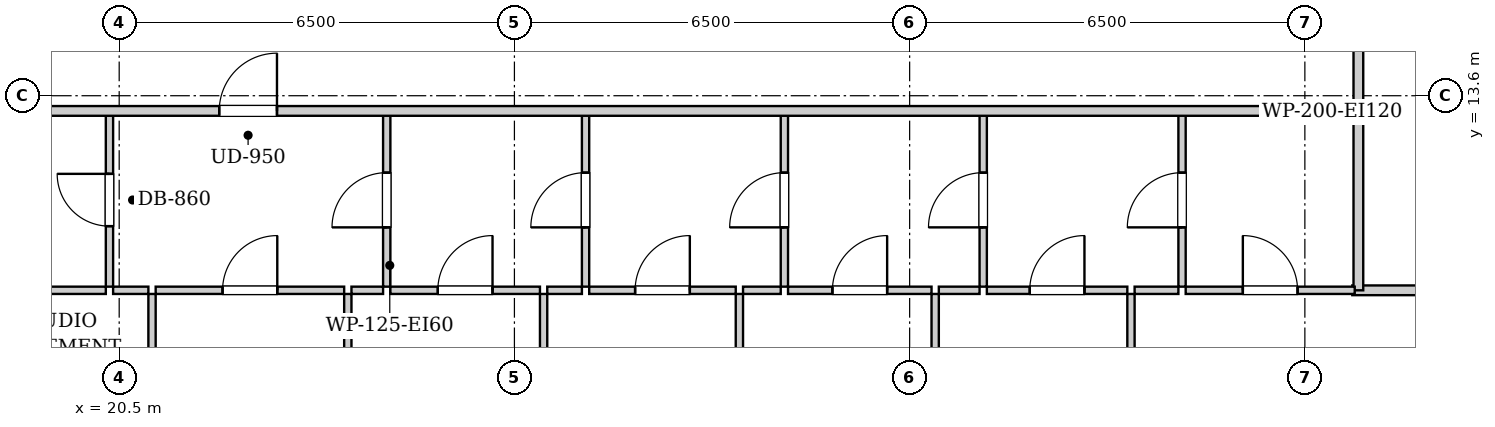
"""IFC4 building model, lengths in metres.
Left out: names, types, materials, properties, quantities, classifications, styles, units other than length and angle.
Written with IfcOpenShell. Run it as: python <this file> out.ifc"""

import sys

from ifc_helpers import new_model, si_unit, direction, frame, frame_2d, origin, place, context, subcontext, project, spatial, rectangle, extrude, element, fill, save


model = new_model("IFC4")
c1 = context("Model", 3, precision=1e-05, world=origin(), true_north=direction((0.0, 1.0)))
c2 = subcontext(c1, "Body", "Model", "MODEL_VIEW")
j1 = project(units=[si_unit("LENGTHUNIT", "METRE"), si_unit("PLANEANGLEUNIT", "RADIAN")], contexts=[c1])
p1 = place(None, origin())
s1 = spatial("IfcSite", under=j1, at=p1, CompositionType="ELEMENT")
p2 = place(p1, origin())
s2 = spatial("IfcBuilding", under=s1, at=p2, CompositionType="ELEMENT")
p3 = place(p2, frame((0.0, 0.0, 110.3)))
s3 = spatial("IfcBuildingStorey", under=s2, at=p3, CompositionType="ELEMENT", Elevation=110.3)
p4 = place(p3, frame((40.88, 13.35, 0.0), z_axis=(0.0, 0.0, 1.0), x_axis=(0.0, 1.0, 0.0)))
e1 = element("IfcWall", 1, at=p4, inside=s3, PredefinedType="PARTITIONING", context=c2, shape_type="SweptSolid", body=[
    extrude(rectangle(XDim=1.74, YDim=0.16, at=frame_2d((0.87, 0.0))), origin(), (0.0, 0.0, 1.0), 2.94),
])
p5 = place(p3, frame((40.78, 10.4, 0.0), z_axis=(0.0, 0.0, 1.0), x_axis=(1.0, 0.0, 0.0)))
e2 = element("IfcWall", 2, at=p5, inside=s3, PredefinedType="PARTITIONING", context=c2, shape_type="SweptSolid", body=[
    extrude(rectangle(XDim=2.34, YDim=0.16, at=frame_2d((1.17, 0.0))), origin(), (0.0, 0.0, 1.0), 2.94),
])
p6 = place(p3, frame((40.88, 10.4, 0.0), z_axis=(0.0, 0.0, 1.0), x_axis=(0.0, 1.0, 0.0)))
e3 = element("IfcWall", 3, at=p6, inside=s3, PredefinedType="PARTITIONING", context=c2, shape_type="SweptSolid", body=[
    extrude(rectangle(XDim=2.91, YDim=0.16, at=frame_2d((1.455, 0.0))), origin(), (0.0, 0.0, 1.0), 2.94),
])
p7 = place(p3, frame((20.34, 10.46, 0.0), z_axis=(0.0, 0.0, 1.0), x_axis=(0.0, 1.0, 0.0)))
e4 = element("IfcWall", 4, at=p7, inside=s3, PredefinedType="PARTITIONING", context=c2, shape_type="SweptSolid", body=[
    extrude(rectangle(XDim=2.85, YDim=0.12, at=frame_2d((1.425, 0.0))), origin(), (0.0, 0.0, 1.0), 2.94),
])
p8 = place(p7, frame((0.995, 0.0, 0.0)))
e5 = element("IfcOpeningElement", 5, at=p8, cuts=e4, PredefinedType="OPENING", context=c2, shape_type="SweptSolid", body=[
    extrude(rectangle(XDim=0.86, YDim=2.05, at=frame_2d((0.43, 1.025))), frame((0.0, 0.07, 0.0), z_axis=(0.0, -1.0, 0.0), x_axis=(1.0, 0.0, 0.0)), (0.0, 0.0, 1.0), 0.14),
])
p9 = place(p3, frame((17.88, 10.4, 0.0), z_axis=(0.0, 0.0, 1.0), x_axis=(1.0, 0.0, 0.0)))
e6 = element("IfcWall", 6, at=p9, inside=s3, PredefinedType="PARTITIONING", context=c2, shape_type="SweptSolid", body=[
    extrude(rectangle(XDim=2.4, YDim=0.12, at=frame_2d((1.2, 0.0))), origin(), (0.0, 0.0, 1.0), 2.94),
])
p10 = place(p3, frame((24.9, 10.46, 0.0), z_axis=(0.0, 0.0, 1.0), x_axis=(0.0, 1.0, 0.0)))
e7 = element("IfcWall", 7, at=p10, inside=s3, PredefinedType="PARTITIONING", context=c2, shape_type="SweptSolid", body=[
    extrude(rectangle(XDim=2.85, YDim=0.12, at=frame_2d((1.425, 0.0))), origin(), (0.0, 0.0, 1.0), 2.94),
])
p11 = place(p10, frame((0.975, 0.0, 0.0)))
e8 = element("IfcOpeningElement", 8, at=p11, cuts=e7, PredefinedType="OPENING", context=c2, shape_type="SweptSolid", body=[
    extrude(rectangle(XDim=0.9, YDim=2.05, at=frame_2d((0.45, 1.025))), frame((0.0, 0.07, 0.0), z_axis=(0.0, -1.0, 0.0), x_axis=(1.0, 0.0, 0.0)), (0.0, 0.0, 1.0), 0.14),
])
p12 = place(p3, frame((20.4, 10.4, 0.0), z_axis=(0.0, 0.0, 1.0), x_axis=(1.0, 0.0, 0.0)))
e9 = element("IfcWall", 9, at=p12, inside=s3, PredefinedType="PARTITIONING", context=c2, shape_type="SweptSolid", body=[
    extrude(rectangle(XDim=0.58, YDim=0.12, at=frame_2d((0.29, 0.0))), origin(), (0.0, 0.0, 1.0), 2.94),
])
p13 = place(p3, frame((21.1, 10.4, 0.0), z_axis=(0.0, 0.0, 1.0), x_axis=(1.0, 0.0, 0.0)))
e10 = element("IfcWall", 10, at=p13, inside=s3, PredefinedType="PARTITIONING", context=c2, shape_type="SweptSolid", body=[
    extrude(rectangle(XDim=3.1, YDim=0.12, at=frame_2d((1.55, 0.0))), origin(), (0.0, 0.0, 1.0), 2.94),
])
p14 = place(p13, frame((1.1, 0.0, 0.0)))
e11 = element("IfcOpeningElement", 11, at=p14, cuts=e10, PredefinedType="OPENING", context=c2, shape_type="SweptSolid", body=[
    extrude(rectangle(XDim=0.9, YDim=2.05, at=frame_2d((0.45, 1.025))), frame((0.0, 0.07, 0.0), z_axis=(0.0, -1.0, 0.0), x_axis=(1.0, 0.0, 0.0)), (0.0, 0.0, 1.0), 0.14),
])
p15 = place(p3, frame((24.32, 10.4, 0.0), z_axis=(0.0, 0.0, 1.0), x_axis=(1.0, 0.0, 0.0)))
e12 = element("IfcWall", 12, at=p15, inside=s3, PredefinedType="PARTITIONING", context=c2, shape_type="SweptSolid", body=[
    extrude(rectangle(XDim=0.52, YDim=0.12, at=frame_2d((0.26, 0.0))), origin(), (0.0, 0.0, 1.0), 2.94),
])
p16 = place(p3, frame((28.17, 10.46, 0.0), z_axis=(0.0, 0.0, 1.0), x_axis=(0.0, 1.0, 0.0)))
e13 = element("IfcWall", 13, at=p16, inside=s3, PredefinedType="PARTITIONING", context=c2, shape_type="SweptSolid", body=[
    extrude(rectangle(XDim=2.85, YDim=0.12, at=frame_2d((1.425, 0.0))), origin(), (0.0, 0.0, 1.0), 2.94),
])
p17 = place(p16, frame((0.975, 0.0, 0.0)))
e14 = element("IfcOpeningElement", 14, at=p17, cuts=e13, PredefinedType="OPENING", context=c2, shape_type="SweptSolid", body=[
    extrude(rectangle(XDim=0.9, YDim=2.05, at=frame_2d((0.45, 1.025))), frame((0.0, 0.07, 0.0), z_axis=(0.0, -1.0, 0.0), x_axis=(1.0, 0.0, 0.0)), (0.0, 0.0, 1.0), 0.14),
])
p18 = place(p3, frame((24.96, 10.4, 0.0), z_axis=(0.0, 0.0, 1.0), x_axis=(1.0, 0.0, 0.0)))
e15 = element("IfcWall", 15, at=p18, inside=s3, PredefinedType="PARTITIONING", context=c2, shape_type="SweptSolid", body=[
    extrude(rectangle(XDim=2.46, YDim=0.12, at=frame_2d((1.23, 0.0))), origin(), (0.0, 0.0, 1.0), 2.94),
])
p19 = place(p18, frame((0.78, 0.0, 0.0)))
e16 = element("IfcOpeningElement", 16, at=p19, cuts=e15, PredefinedType="OPENING", context=c2, shape_type="SweptSolid", body=[
    extrude(rectangle(XDim=0.9, YDim=2.05, at=frame_2d((0.45, 1.025))), frame((0.0, 0.07, 0.0), z_axis=(0.0, -1.0, 0.0), x_axis=(1.0, 0.0, 0.0)), (0.0, 0.0, 1.0), 0.14),
])
p20 = place(p3, frame((27.54, 10.4, 0.0), z_axis=(0.0, 0.0, 1.0), x_axis=(1.0, 0.0, 0.0)))
e17 = element("IfcWall", 17, at=p20, inside=s3, PredefinedType="PARTITIONING", context=c2, shape_type="SweptSolid", body=[
    extrude(rectangle(XDim=0.57, YDim=0.12, at=frame_2d((0.285, 0.0))), origin(), (0.0, 0.0, 1.0), 2.94),
])
p21 = place(p3, frame((31.44, 10.46, 0.0), z_axis=(0.0, 0.0, 1.0), x_axis=(0.0, 1.0, 0.0)))
e18 = element("IfcWall", 18, at=p21, inside=s3, PredefinedType="PARTITIONING", context=c2, shape_type="SweptSolid", body=[
    extrude(rectangle(XDim=2.85, YDim=0.12, at=frame_2d((1.425, 0.0))), origin(), (0.0, 0.0, 1.0), 2.94),
])
p22 = place(p21, frame((0.975, 0.0, 0.0)))
e19 = element("IfcOpeningElement", 19, at=p22, cuts=e18, PredefinedType="OPENING", context=c2, shape_type="SweptSolid", body=[
    extrude(rectangle(XDim=0.9, YDim=2.05, at=frame_2d((0.45, 1.025))), frame((0.0, 0.07, 0.0), z_axis=(0.0, -1.0, 0.0), x_axis=(1.0, 0.0, 0.0)), (0.0, 0.0, 1.0), 0.14),
])
p23 = place(p3, frame((28.23, 10.4, 0.0), z_axis=(0.0, 0.0, 1.0), x_axis=(1.0, 0.0, 0.0)))
e20 = element("IfcWall", 20, at=p23, inside=s3, PredefinedType="PARTITIONING", context=c2, shape_type="SweptSolid", body=[
    extrude(rectangle(XDim=2.41, YDim=0.12, at=frame_2d((1.205, 0.0))), origin(), (0.0, 0.0, 1.0), 2.94),
])
p24 = place(p23, frame((0.755, 0.0, 0.0)))
e21 = element("IfcOpeningElement", 21, at=p24, cuts=e20, PredefinedType="OPENING", context=c2, shape_type="SweptSolid", body=[
    extrude(rectangle(XDim=0.9, YDim=2.05, at=frame_2d((0.45, 1.025))), frame((0.0, 0.07, 0.0), z_axis=(0.0, -1.0, 0.0), x_axis=(1.0, 0.0, 0.0)), (0.0, 0.0, 1.0), 0.14),
])
p25 = place(p3, frame((30.76, 10.4, 0.0), z_axis=(0.0, 0.0, 1.0), x_axis=(1.0, 0.0, 0.0)))
e22 = element("IfcWall", 22, at=p25, inside=s3, PredefinedType="PARTITIONING", context=c2, shape_type="SweptSolid", body=[
    extrude(rectangle(XDim=0.62, YDim=0.12, at=frame_2d((0.31, 0.0))), origin(), (0.0, 0.0, 1.0), 2.94),
])
p26 = place(p3, frame((34.71, 10.46, 0.0), z_axis=(0.0, 0.0, 1.0), x_axis=(0.0, 1.0, 0.0)))
e23 = element("IfcWall", 23, at=p26, inside=s3, PredefinedType="PARTITIONING", context=c2, shape_type="SweptSolid", body=[
    extrude(rectangle(XDim=2.85, YDim=0.12, at=frame_2d((1.425, 0.0))), origin(), (0.0, 0.0, 1.0), 2.94),
])
p27 = place(p26, frame((0.975, 0.0, 0.0)))
e24 = element("IfcOpeningElement", 24, at=p27, cuts=e23, PredefinedType="OPENING", context=c2, shape_type="SweptSolid", body=[
    extrude(rectangle(XDim=0.9, YDim=2.05, at=frame_2d((0.45, 1.025))), frame((0.0, 0.07, 0.0), z_axis=(0.0, -1.0, 0.0), x_axis=(1.0, 0.0, 0.0)), (0.0, 0.0, 1.0), 0.14),
])
p28 = place(p3, frame((31.5, 10.4, 0.0), z_axis=(0.0, 0.0, 1.0), x_axis=(1.0, 0.0, 0.0)))
e25 = element("IfcWall", 25, at=p28, inside=s3, PredefinedType="PARTITIONING", context=c2, shape_type="SweptSolid", body=[
    extrude(rectangle(XDim=2.36, YDim=0.12, at=frame_2d((1.18, 0.0))), origin(), (0.0, 0.0, 1.0), 2.94),
])
p29 = place(p28, frame((0.73, 0.0, 0.0)))
e26 = element("IfcOpeningElement", 26, at=p29, cuts=e25, PredefinedType="OPENING", context=c2, shape_type="SweptSolid", body=[
    extrude(rectangle(XDim=0.9, YDim=2.05, at=frame_2d((0.45, 1.025))), frame((0.0, 0.07, 0.0), z_axis=(0.0, -1.0, 0.0), x_axis=(1.0, 0.0, 0.0)), (0.0, 0.0, 1.0), 0.14),
])
p30 = place(p3, frame((33.98, 10.4, 0.0), z_axis=(0.0, 0.0, 1.0), x_axis=(1.0, 0.0, 0.0)))
e27 = element("IfcWall", 27, at=p30, inside=s3, PredefinedType="PARTITIONING", context=c2, shape_type="SweptSolid", body=[
    extrude(rectangle(XDim=0.67, YDim=0.12, at=frame_2d((0.335, 0.0))), origin(), (0.0, 0.0, 1.0), 2.94),
])
p31 = place(p3, frame((37.98, 10.46, 0.0), z_axis=(0.0, 0.0, 1.0), x_axis=(0.0, 1.0, 0.0)))
e28 = element("IfcWall", 28, at=p31, inside=s3, PredefinedType="PARTITIONING", context=c2, shape_type="SweptSolid", body=[
    extrude(rectangle(XDim=2.85, YDim=0.12, at=frame_2d((1.425, 0.0))), origin(), (0.0, 0.0, 1.0), 2.94),
])
p32 = place(p31, frame((0.975, 0.0, 0.0)))
e29 = element("IfcOpeningElement", 29, at=p32, cuts=e28, PredefinedType="OPENING", context=c2, shape_type="SweptSolid", body=[
    extrude(rectangle(XDim=0.9, YDim=2.05, at=frame_2d((0.45, 1.025))), frame((0.0, 0.07, 0.0), z_axis=(0.0, -1.0, 0.0), x_axis=(1.0, 0.0, 0.0)), (0.0, 0.0, 1.0), 0.14),
])
p33 = place(p3, frame((34.77, 10.4, 0.0), z_axis=(0.0, 0.0, 1.0), x_axis=(1.0, 0.0, 0.0)))
e30 = element("IfcWall", 30, at=p33, inside=s3, PredefinedType="PARTITIONING", context=c2, shape_type="SweptSolid", body=[
    extrude(rectangle(XDim=2.31, YDim=0.12, at=frame_2d((1.155, 0.0))), origin(), (0.0, 0.0, 1.0), 2.94),
])
p34 = place(p33, frame((0.705, 0.0, 0.0)))
e31 = element("IfcOpeningElement", 31, at=p34, cuts=e30, PredefinedType="OPENING", context=c2, shape_type="SweptSolid", body=[
    extrude(rectangle(XDim=0.9, YDim=2.05, at=frame_2d((0.45, 1.025))), frame((0.0, 0.07, 0.0), z_axis=(0.0, -1.0, 0.0), x_axis=(1.0, 0.0, 0.0)), (0.0, 0.0, 1.0), 0.14),
])
p35 = place(p3, frame((37.2, 10.4, 0.0), z_axis=(0.0, 0.0, 1.0), x_axis=(1.0, 0.0, 0.0)))
e32 = element("IfcWall", 32, at=p35, inside=s3, PredefinedType="PARTITIONING", context=c2, shape_type="SweptSolid", body=[
    extrude(rectangle(XDim=0.72, YDim=0.12, at=frame_2d((0.36, 0.0))), origin(), (0.0, 0.0, 1.0), 2.94),
])
p36 = place(p3, frame((38.04, 10.4, 0.0), z_axis=(0.0, 0.0, 1.0), x_axis=(1.0, 0.0, 0.0)))
e33 = element("IfcWall", 33, at=p36, inside=s3, PredefinedType="PARTITIONING", context=c2, shape_type="SweptSolid", body=[
    extrude(rectangle(XDim=2.78, YDim=0.12, at=frame_2d((1.39, 0.0))), origin(), (0.0, 0.0, 1.0), 2.94),
])
p37 = place(p36, frame((0.94, 0.0, 0.0)))
e34 = element("IfcOpeningElement", 34, at=p37, cuts=e33, PredefinedType="OPENING", context=c2, shape_type="SweptSolid", body=[
    extrude(rectangle(XDim=0.9, YDim=2.05, at=frame_2d((0.45, 1.025))), frame((0.0, 0.07, 0.0), z_axis=(0.0, -1.0, 0.0), x_axis=(1.0, 0.0, 0.0)), (0.0, 0.0, 1.0), 0.14),
])
p38 = place(p3, frame((21.04, 0.28, 0.0), z_axis=(0.0, 0.0, 1.0), x_axis=(0.0, 1.0, 0.0)))
e35 = element("IfcWall", 35, at=p38, inside=s3, PredefinedType="PARTITIONING", context=c2, shape_type="SweptSolid", body=[
    extrude(rectangle(XDim=10.06, YDim=0.12, at=frame_2d((5.03, 0.0))), origin(), (0.0, 0.0, 1.0), 2.94),
])
p39 = place(p38, frame((4.565, 0.0, 0.0)))
e36 = element("IfcOpeningElement", 36, at=p39, cuts=e35, PredefinedType="OPENING", context=c2, shape_type="SweptSolid", body=[
    extrude(rectangle(XDim=0.9, YDim=2.05, at=frame_2d((0.45, 1.025))), frame((0.0, 0.07, 0.0), z_axis=(0.0, -1.0, 0.0), x_axis=(1.0, 0.0, 0.0)), (0.0, 0.0, 1.0), 0.14),
])
p40 = place(p3, frame((24.26, 0.28, 0.0), z_axis=(0.0, 0.0, 1.0), x_axis=(0.0, 1.0, 0.0)))
e37 = element("IfcWall", 37, at=p40, inside=s3, PredefinedType="PARTITIONING", context=c2, shape_type="SweptSolid", body=[
    extrude(rectangle(XDim=10.06, YDim=0.12, at=frame_2d((5.03, 0.0))), origin(), (0.0, 0.0, 1.0), 2.94),
])
p41 = place(p40, frame((4.565, 0.0, 0.0)))
e38 = element("IfcOpeningElement", 38, at=p41, cuts=e37, PredefinedType="OPENING", context=c2, shape_type="SweptSolid", body=[
    extrude(rectangle(XDim=0.9, YDim=2.05, at=frame_2d((0.45, 1.025))), frame((0.0, 0.07, 0.0), z_axis=(0.0, -1.0, 0.0), x_axis=(1.0, 0.0, 0.0)), (0.0, 0.0, 1.0), 0.14),
])
p42 = place(p3, frame((27.48, 0.28, 0.0), z_axis=(0.0, 0.0, 1.0), x_axis=(0.0, 1.0, 0.0)))
e39 = element("IfcWall", 39, at=p42, inside=s3, PredefinedType="PARTITIONING", context=c2, shape_type="SweptSolid", body=[
    extrude(rectangle(XDim=10.06, YDim=0.12, at=frame_2d((5.03, 0.0))), origin(), (0.0, 0.0, 1.0), 2.94),
])
p43 = place(p42, frame((4.565, 0.0, 0.0)))
e40 = element("IfcOpeningElement", 40, at=p43, cuts=e39, PredefinedType="OPENING", context=c2, shape_type="SweptSolid", body=[
    extrude(rectangle(XDim=0.9, YDim=2.05, at=frame_2d((0.45, 1.025))), frame((0.0, 0.07, 0.0), z_axis=(0.0, -1.0, 0.0), x_axis=(1.0, 0.0, 0.0)), (0.0, 0.0, 1.0), 0.14),
])
p44 = place(p3, frame((30.7, 0.28, 0.0), z_axis=(0.0, 0.0, 1.0), x_axis=(0.0, 1.0, 0.0)))
e41 = element("IfcWall", 41, at=p44, inside=s3, PredefinedType="PARTITIONING", context=c2, shape_type="SweptSolid", body=[
    extrude(rectangle(XDim=10.06, YDim=0.12, at=frame_2d((5.03, 0.0))), origin(), (0.0, 0.0, 1.0), 2.94),
])
p45 = place(p44, frame((4.565, 0.0, 0.0)))
e42 = element("IfcOpeningElement", 42, at=p45, cuts=e41, PredefinedType="OPENING", context=c2, shape_type="SweptSolid", body=[
    extrude(rectangle(XDim=0.9, YDim=2.05, at=frame_2d((0.45, 1.025))), frame((0.0, 0.07, 0.0), z_axis=(0.0, -1.0, 0.0), x_axis=(1.0, 0.0, 0.0)), (0.0, 0.0, 1.0), 0.14),
])
p46 = place(p3, frame((33.92, 0.28, 0.0), z_axis=(0.0, 0.0, 1.0), x_axis=(0.0, 1.0, 0.0)))
e43 = element("IfcWall", 43, at=p46, inside=s3, PredefinedType="PARTITIONING", context=c2, shape_type="SweptSolid", body=[
    extrude(rectangle(XDim=10.06, YDim=0.12, at=frame_2d((5.03, 0.0))), origin(), (0.0, 0.0, 1.0), 2.94),
])
p47 = place(p46, frame((4.565, 0.0, 0.0)))
e44 = element("IfcOpeningElement", 44, at=p47, cuts=e43, PredefinedType="OPENING", context=c2, shape_type="SweptSolid", body=[
    extrude(rectangle(XDim=0.9, YDim=2.05, at=frame_2d((0.45, 1.025))), frame((0.0, 0.07, 0.0), z_axis=(0.0, -1.0, 0.0), x_axis=(1.0, 0.0, 0.0)), (0.0, 0.0, 1.0), 0.14),
])
p48 = place(p3, frame((37.14, 0.28, 0.0), z_axis=(0.0, 0.0, 1.0), x_axis=(0.0, 1.0, 0.0)))
e45 = element("IfcWall", 45, at=p48, inside=s3, PredefinedType="PARTITIONING", context=c2, shape_type="SweptSolid", body=[
    extrude(rectangle(XDim=10.06, YDim=0.12, at=frame_2d((5.03, 0.0))), origin(), (0.0, 0.0, 1.0), 2.94),
])
p49 = place(p48, frame((4.565, 0.0, 0.0)))
e46 = element("IfcOpeningElement", 46, at=p49, cuts=e45, PredefinedType="OPENING", context=c2, shape_type="SweptSolid", body=[
    extrude(rectangle(XDim=0.9, YDim=2.05, at=frame_2d((0.45, 1.025))), frame((0.0, 0.07, 0.0), z_axis=(0.0, -1.0, 0.0), x_axis=(1.0, 0.0, 0.0)), (0.0, 0.0, 1.0), 0.14),
])
p50 = place(p3, frame((10.05, 13.35, 0.0), z_axis=(0.0, 0.0, 1.0), x_axis=(1.0, 0.0, 0.0)))
e47 = element("IfcWall", 47, at=p50, inside=s3, PredefinedType="PARTITIONING", context=c2, shape_type="SweptSolid", body=[
    extrude(rectangle(XDim=30.8, YDim=0.16, at=frame_2d((15.4, 0.0))), origin(), (0.0, 0.0, 1.0), 2.94),
])
p51 = place(p50, frame((3.692, 0.0, 0.0)))
e48 = element("IfcOpeningElement", 48, at=p51, cuts=e47, PredefinedType="OPENING", context=c2, shape_type="SweptSolid", body=[
    extrude(rectangle(XDim=0.95, YDim=2.1, at=frame_2d((0.475, 1.05))), frame((0.0, 0.09, 0.0), z_axis=(0.0, -1.0, 0.0), x_axis=(1.0, 0.0, 0.0)), (0.0, 0.0, 1.0), 0.18),
])
p52 = place(p50, frame((12.095, 0.0, 0.0)))
e49 = element("IfcOpeningElement", 49, at=p52, cuts=e47, PredefinedType="OPENING", context=c2, shape_type="SweptSolid", body=[
    extrude(rectangle(XDim=0.95, YDim=2.1, at=frame_2d((0.475, 1.05))), frame((0.0, 0.09, 0.0), z_axis=(0.0, -1.0, 0.0), x_axis=(1.0, 0.0, 0.0)), (0.0, 0.0, 1.0), 0.18),
])
p53 = place(p8, origin())
e50 = element("IfcDoor", 50, at=p53, inside=s3, OperationType="SINGLE_SWING_RIGHT", PredefinedType="DOOR", context=c2, shape_type="SweptSolid", body=[
    extrude(rectangle(XDim=0.86, YDim=2.05, at=frame_2d((0.43, 1.025))), frame((0.0, 0.025, 0.0), z_axis=(0.0, -1.0, 0.0), x_axis=(1.0, 0.0, 0.0)), (0.0, 0.0, 1.0), 0.05),
])
fill(e5, e50)
p54 = place(p11, origin())
e51 = element("IfcDoor", 51, at=p54, inside=s3, OperationType="SINGLE_SWING_LEFT", PredefinedType="DOOR", context=c2, shape_type="SweptSolid", body=[
    extrude(rectangle(XDim=0.9, YDim=2.05, at=frame_2d((0.45, 1.025))), frame((0.0, 0.025, 0.0), z_axis=(0.0, -1.0, 0.0), x_axis=(1.0, 0.0, 0.0)), (0.0, 0.0, 1.0), 0.05),
])
fill(e8, e51)
p55 = place(p14, origin())
e52 = element("IfcDoor", 52, at=p55, inside=s3, OperationType="SINGLE_SWING_RIGHT", PredefinedType="DOOR", context=c2, shape_type="SweptSolid", body=[
    extrude(rectangle(XDim=0.9, YDim=2.05, at=frame_2d((0.45, 1.025))), frame((0.0, 0.025, 0.0), z_axis=(0.0, -1.0, 0.0), x_axis=(1.0, 0.0, 0.0)), (0.0, 0.0, 1.0), 0.05),
])
fill(e11, e52)
p56 = place(p17, origin())
e53 = element("IfcDoor", 53, at=p56, inside=s3, OperationType="SINGLE_SWING_LEFT", PredefinedType="DOOR", context=c2, shape_type="SweptSolid", body=[
    extrude(rectangle(XDim=0.9, YDim=2.05, at=frame_2d((0.45, 1.025))), frame((0.0, 0.025, 0.0), z_axis=(0.0, -1.0, 0.0), x_axis=(1.0, 0.0, 0.0)), (0.0, 0.0, 1.0), 0.05),
])
fill(e14, e53)
p57 = place(p19, origin())
e54 = element("IfcDoor", 54, at=p57, inside=s3, OperationType="SINGLE_SWING_RIGHT", PredefinedType="DOOR", context=c2, shape_type="SweptSolid", body=[
    extrude(rectangle(XDim=0.9, YDim=2.05, at=frame_2d((0.45, 1.025))), frame((0.0, 0.025, 0.0), z_axis=(0.0, -1.0, 0.0), x_axis=(1.0, 0.0, 0.0)), (0.0, 0.0, 1.0), 0.05),
])
fill(e16, e54)
p58 = place(p22, origin())
e55 = element("IfcDoor", 55, at=p58, inside=s3, OperationType="SINGLE_SWING_LEFT", PredefinedType="DOOR", context=c2, shape_type="SweptSolid", body=[
    extrude(rectangle(XDim=0.9, YDim=2.05, at=frame_2d((0.45, 1.025))), frame((0.0, 0.025, 0.0), z_axis=(0.0, -1.0, 0.0), x_axis=(1.0, 0.0, 0.0)), (0.0, 0.0, 1.0), 0.05),
])
fill(e19, e55)
p59 = place(p24, origin())
e56 = element("IfcDoor", 56, at=p59, inside=s3, OperationType="SINGLE_SWING_RIGHT", PredefinedType="DOOR", context=c2, shape_type="SweptSolid", body=[
    extrude(rectangle(XDim=0.9, YDim=2.05, at=frame_2d((0.45, 1.025))), frame((0.0, 0.025, 0.0), z_axis=(0.0, -1.0, 0.0), x_axis=(1.0, 0.0, 0.0)), (0.0, 0.0, 1.0), 0.05),
])
fill(e21, e56)
p60 = place(p27, origin())
e57 = element("IfcDoor", 57, at=p60, inside=s3, OperationType="SINGLE_SWING_LEFT", PredefinedType="DOOR", context=c2, shape_type="SweptSolid", body=[
    extrude(rectangle(XDim=0.9, YDim=2.05, at=frame_2d((0.45, 1.025))), frame((0.0, 0.025, 0.0), z_axis=(0.0, -1.0, 0.0), x_axis=(1.0, 0.0, 0.0)), (0.0, 0.0, 1.0), 0.05),
])
fill(e24, e57)
p61 = place(p29, origin())
e58 = element("IfcDoor", 58, at=p61, inside=s3, OperationType="SINGLE_SWING_RIGHT", PredefinedType="DOOR", context=c2, shape_type="SweptSolid", body=[
    extrude(rectangle(XDim=0.9, YDim=2.05, at=frame_2d((0.45, 1.025))), frame((0.0, 0.025, 0.0), z_axis=(0.0, -1.0, 0.0), x_axis=(1.0, 0.0, 0.0)), (0.0, 0.0, 1.0), 0.05),
])
fill(e26, e58)
p62 = place(p32, origin())
e59 = element("IfcDoor", 59, at=p62, inside=s3, OperationType="SINGLE_SWING_LEFT", PredefinedType="DOOR", context=c2, shape_type="SweptSolid", body=[
    extrude(rectangle(XDim=0.9, YDim=2.05, at=frame_2d((0.45, 1.025))), frame((0.0, 0.025, 0.0), z_axis=(0.0, -1.0, 0.0), x_axis=(1.0, 0.0, 0.0)), (0.0, 0.0, 1.0), 0.05),
])
fill(e29, e59)
p63 = place(p34, origin())
e60 = element("IfcDoor", 60, at=p63, inside=s3, OperationType="SINGLE_SWING_RIGHT", PredefinedType="DOOR", context=c2, shape_type="SweptSolid", body=[
    extrude(rectangle(XDim=0.9, YDim=2.05, at=frame_2d((0.45, 1.025))), frame((0.0, 0.025, 0.0), z_axis=(0.0, -1.0, 0.0), x_axis=(1.0, 0.0, 0.0)), (0.0, 0.0, 1.0), 0.05),
])
fill(e31, e60)
p64 = place(p37, origin())
e61 = element("IfcDoor", 61, at=p64, inside=s3, OperationType="SINGLE_SWING_LEFT", PredefinedType="DOOR", context=c2, shape_type="SweptSolid", body=[
    extrude(rectangle(XDim=0.9, YDim=2.05, at=frame_2d((0.45, 1.025))), frame((0.0, 0.025, 0.0), z_axis=(0.0, -1.0, 0.0), x_axis=(1.0, 0.0, 0.0)), (0.0, 0.0, 1.0), 0.05),
])
fill(e34, e61)
p65 = place(p52, origin())
e62 = element("IfcDoor", 62, at=p65, inside=s3, OperationType="SINGLE_SWING_RIGHT", PredefinedType="DOOR", context=c2, shape_type="SweptSolid", body=[
    extrude(rectangle(XDim=0.95, YDim=2.1, at=frame_2d((0.475, 1.05))), frame((0.0, 0.025, 0.0), z_axis=(0.0, -1.0, 0.0), x_axis=(1.0, 0.0, 0.0)), (0.0, 0.0, 1.0), 0.05),
])
fill(e49, e62)
save(model, sys.argv[1])
